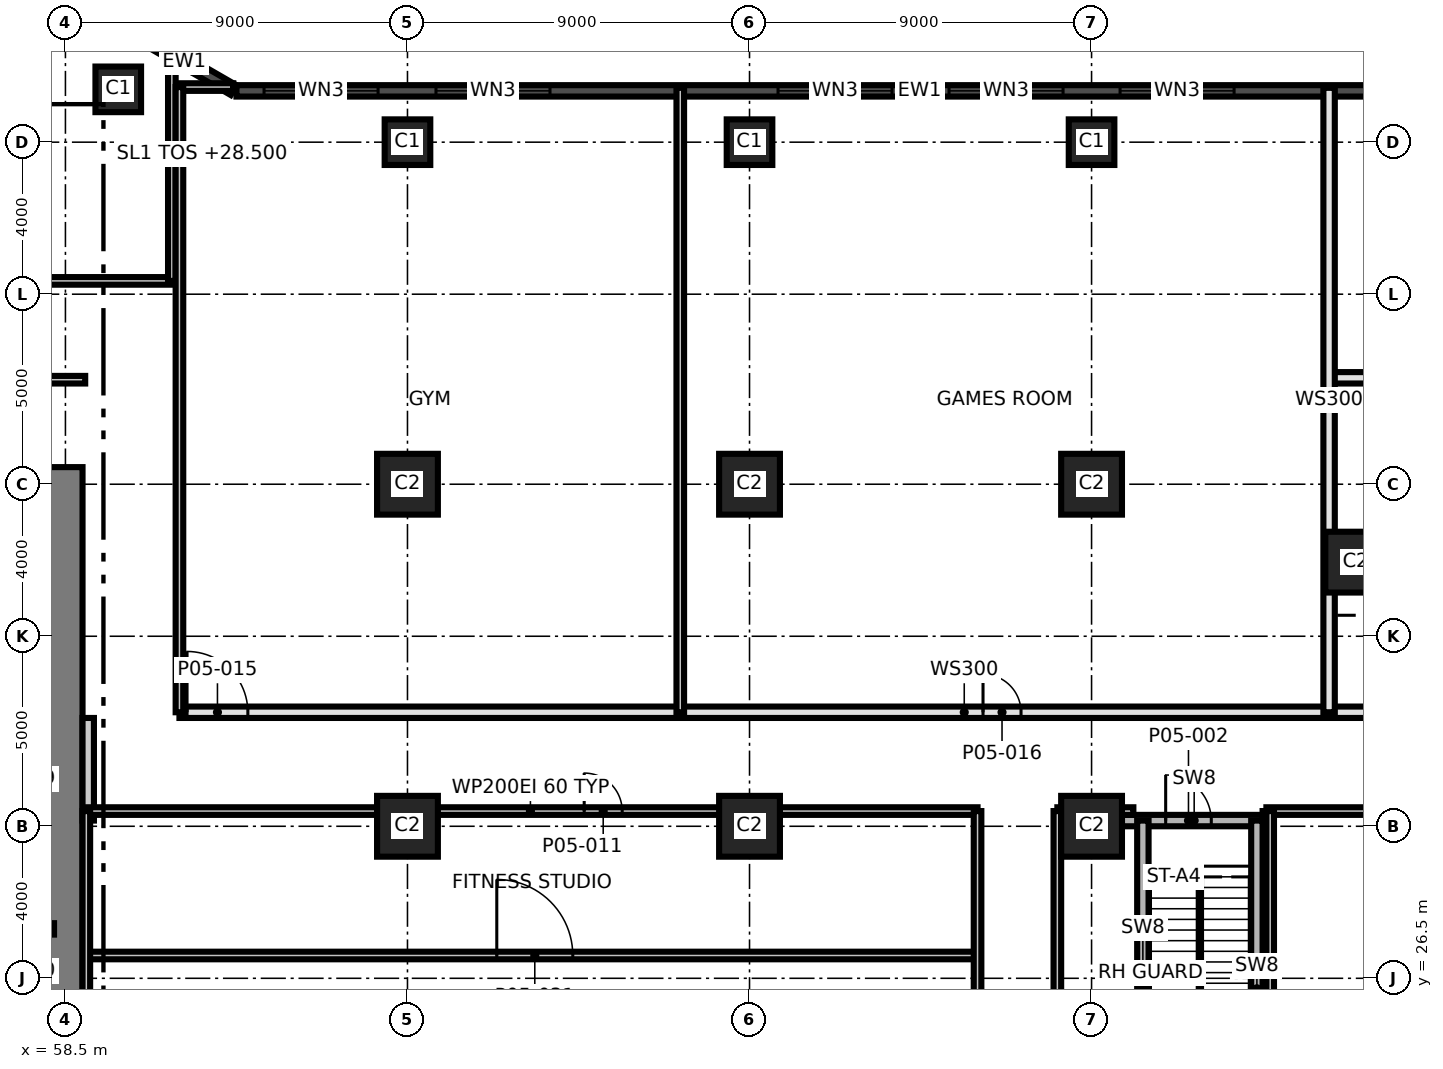
"""IFC4 building model, lengths in metres.
Left out: names, types, materials, properties, quantities, classifications, styles, units other than length and angle.
Written with IfcOpenShell. Run it as: python <this file> out.ifc"""

import sys

from ifc_helpers import new_model, si_unit, direction, frame, frame_2d, origin, origin_2d, place, context, subcontext, project, spatial, rectangle, extrude, element, fill, save


model = new_model("IFC4")
c1 = context("Model", 3, precision=1e-05, world=origin(), true_north=direction((0.0, 1.0)))
c2 = subcontext(c1, "Body", "Model", "MODEL_VIEW")
j1 = project(units=[si_unit("LENGTHUNIT", "METRE"), si_unit("PLANEANGLEUNIT", "RADIAN")], contexts=[c1])
p1 = place(None, origin())
s1 = spatial("IfcSite", under=j1, at=p1, CompositionType="ELEMENT")
p2 = place(p1, origin())
s2 = spatial("IfcBuilding", under=s1, at=p2, CompositionType="ELEMENT")
p3 = place(p2, frame((0.0, 0.0, 28.5)))
s3 = spatial("IfcBuildingStorey", under=s2, at=p3, CompositionType="ELEMENT", Elevation=28.5)
p4 = place(p3, frame((58.5, 21.05, 0.0), z_axis=(0.0, 0.0, 1.0), x_axis=(0.0, 1.0, 0.0)))
e1 = element("IfcWall", 1, at=p4, inside=s3, PredefinedType="SHEAR", context=c2, shape_type="SweptSolid", body=[
    extrude(rectangle(XDim=18.9, YDim=0.9, at=frame_2d((9.45, 0.0))), origin(), (0.0, 0.0, 1.0), 5.0),
])
for number, where, z_axis, x_axis in (
    (2, (67.5, 30.5, 0.0), (0.0, 0.0, 1.0), (1.0, 0.0, 0.0)),
    (3, (76.5, 30.5, 0.0), (0.0, 0.0, 1.0), (1.0, 0.0, 0.0)),
    (4, (85.5, 30.5, 0.0), (0.0, 0.0, 1.0), (1.0, 0.0, 0.0)),
    (5, (67.5, 39.5, 0.0), (0.0, 0.0, 1.0), (1.0, 0.0, 0.0)),
    (6, (76.5, 39.5, 0.0), (0.0, 0.0, 1.0), (1.0, 0.0, 0.0)),
    (7, (85.5, 39.5, 0.0), (0.0, 0.0, 1.0), (1.0, 0.0, 0.0)),
):
    element("IfcColumn", number, at=place(p3, frame(where, z_axis=z_axis, x_axis=x_axis)), inside=s3, PredefinedType="COLUMN", context=c2, shape_type="SweptSolid", body=[
        extrude(rectangle(XDim=1.6, YDim=1.6, at=origin_2d()), origin(), (0.0, 0.0, 1.0), 5.0),
    ])
for number, where, z_axis, x_axis in (
    (8, (67.5, 48.5, 0.0), (0.0, 0.0, 1.0), (1.0, 0.0, 0.0)),
    (9, (76.5, 48.5, 0.0), (0.0, 0.0, 1.0), (1.0, 0.0, 0.0)),
    (10, (85.5, 48.5, 0.0), (0.0, 0.0, 1.0), (1.0, 0.0, 0.0)),
    (11, (59.89, 49.89, 0.0), (0.0, 0.0, 1.0), (1.0, 0.0, 0.0)),
):
    element("IfcColumn", number, at=place(p3, frame(where, z_axis=z_axis, x_axis=x_axis)), inside=s3, PredefinedType="COLUMN", context=c2, shape_type="SweptSolid", body=[
        extrude(rectangle(XDim=1.2, YDim=1.2, at=origin_2d()), origin(), (0.0, 0.0, 1.0), 5.0),
    ])
p5 = place(p3, frame((92.45, 37.45, 0.0), z_axis=(0.0, 0.0, 1.0), x_axis=(1.0, 0.0, 0.0)))
e12 = element("IfcColumn", 12, at=p5, inside=s3, PredefinedType="COLUMN", context=c2, shape_type="SweptSolid", body=[
    extrude(rectangle(XDim=1.6, YDim=1.6, at=origin_2d()), origin(), (0.0, 0.0, 1.0), 5.0),
])
p6 = place(p3, frame((98.952, 49.85, 0.0), z_axis=(0.0, 0.0, 1.0), x_axis=(-1.0, 0.0, 0.0)))
e13 = element("IfcWall", 13, at=p6, inside=s3, PredefinedType="SOLIDWALL", context=c2, shape_type="SweptSolid", body=[
    extrude(rectangle(XDim=35.952, YDim=0.3, at=frame_2d((17.976, 0.0))), origin(), (0.0, 0.0, 1.0), 4.7),
])
p7 = place(p6, frame((9.702, 0.0, 0.9)))
e14 = element("IfcOpeningElement", 14, at=p7, cuts=e13, PredefinedType="OPENING", context=c2, shape_type="SweptSolid", body=[
    extrude(rectangle(XDim=3.0, YDim=2.4, at=frame_2d((1.5, 1.2))), frame((0.0, 0.16, 0.0), z_axis=(0.0, -1.0, 0.0), x_axis=(1.0, 0.0, 0.0)), (0.0, 0.0, 1.0), 0.32),
])
p8 = place(p6, frame((14.202, 0.0, 0.9)))
e15 = element("IfcOpeningElement", 15, at=p8, cuts=e13, PredefinedType="OPENING", context=c2, shape_type="SweptSolid", body=[
    extrude(rectangle(XDim=3.0, YDim=2.4, at=frame_2d((1.5, 1.2))), frame((0.0, 0.16, 0.0), z_axis=(0.0, -1.0, 0.0), x_axis=(1.0, 0.0, 0.0)), (0.0, 0.0, 1.0), 0.32),
])
p9 = place(p6, frame((18.702, 0.0, 0.9)))
e16 = element("IfcOpeningElement", 16, at=p9, cuts=e13, PredefinedType="OPENING", context=c2, shape_type="SweptSolid", body=[
    extrude(rectangle(XDim=3.0, YDim=2.4, at=frame_2d((1.5, 1.2))), frame((0.0, 0.16, 0.0), z_axis=(0.0, -1.0, 0.0), x_axis=(1.0, 0.0, 0.0)), (0.0, 0.0, 1.0), 0.32),
])
p10 = place(p6, frame((27.702, 0.0, 0.9)))
e17 = element("IfcOpeningElement", 17, at=p10, cuts=e13, PredefinedType="OPENING", context=c2, shape_type="SweptSolid", body=[
    extrude(rectangle(XDim=3.0, YDim=2.4, at=frame_2d((1.5, 1.2))), frame((0.0, 0.16, 0.0), z_axis=(0.0, -1.0, 0.0), x_axis=(1.0, 0.0, 0.0)), (0.0, 0.0, 1.0), 0.32),
])
p11 = place(p6, frame((32.226, 0.0, 0.9)))
e18 = element("IfcOpeningElement", 18, at=p11, cuts=e13, PredefinedType="OPENING", context=c2, shape_type="SweptSolid", body=[
    extrude(rectangle(XDim=3.0, YDim=2.4, at=frame_2d((1.5, 1.2))), frame((0.0, 0.16, 0.0), z_axis=(0.0, -1.0, 0.0), x_axis=(1.0, 0.0, 0.0)), (0.0, 0.0, 1.0), 0.32),
])
p12 = place(p3, frame((62.925, 49.87, 0.0), z_axis=(0.0, 0.0, 1.0), x_axis=(-0.866031096941, 0.499990139034, 0.0)))
e19 = element("IfcWall", 19, at=p12, inside=s3, PredefinedType="SOLIDWALL", context=c2, shape_type="SweptSolid", body=[
    extrude(rectangle(XDim=3.0, YDim=0.3, at=frame_2d((1.5, 0.0))), origin(), (0.0, 0.0, 1.0), 4.7),
])
p13 = place(p3, frame((55.8, 27.8, 0.0), z_axis=(0.0, 0.0, 1.0), x_axis=(1.0, 0.0, 0.0)))
e20 = element("IfcWall", 20, at=p13, inside=s3, PredefinedType="PARTITIONING", context=c2, shape_type="SweptSolid", body=[
    extrude(rectangle(XDim=2.4, YDim=0.3, at=frame_2d((1.2, 0.0))), origin(), (0.0, 0.0, 1.0), 4.7),
])
p14 = place(p13, frame((0.75, 0.0, 0.0)))
e21 = element("IfcOpeningElement", 21, at=p14, cuts=e20, PredefinedType="OPENING", context=c2, shape_type="SweptSolid", body=[
    extrude(rectangle(XDim=0.9, YDim=2.1, at=frame_2d((0.45, 1.05))), frame((0.0, 0.16, 0.0), z_axis=(0.0, -1.0, 0.0), x_axis=(1.0, 0.0, 0.0)), (0.0, 0.0, 1.0), 0.32),
])
p15 = place(p3, frame((59.1, 30.65, 0.0), z_axis=(0.0, 0.0, 1.0), x_axis=(0.0, 1.0, 0.0)))
e22 = element("IfcWall", 22, at=p15, inside=s3, PredefinedType="PARTITIONING", context=c2, shape_type="SweptSolid", body=[
    extrude(rectangle(XDim=2.7, YDim=0.3, at=frame_2d((1.35, 0.0))), origin(), (0.0, 0.0, 1.0), 4.7),
])
p16 = place(p3, frame((59.05, 27.1, 0.0), z_axis=(0.0, 0.0, 1.0), x_axis=(1.0, 0.0, 0.0)))
e23 = element("IfcWall", 23, at=p16, inside=s3, PredefinedType="PARTITIONING", context=c2, shape_type="SweptSolid", body=[
    extrude(rectangle(XDim=23.45, YDim=0.2, at=frame_2d((11.725, 0.0))), origin(), (0.0, 0.0, 1.0), 4.7),
])
p17 = place(p16, frame((10.8, 0.0, 0.0)))
e24 = element("IfcOpeningElement", 24, at=p17, cuts=e23, PredefinedType="OPENING", context=c2, shape_type="SweptSolid", body=[
    extrude(rectangle(XDim=2.0, YDim=2.1, at=frame_2d((1.0, 1.05))), frame((0.0, 0.11, 0.0), z_axis=(0.0, -1.0, 0.0), x_axis=(1.0, 0.0, 0.0)), (0.0, 0.0, 1.0), 0.22),
])
p18 = place(p3, frame((86.3, 30.65, 0.0), z_axis=(0.0, 0.0, 1.0), x_axis=(1.0, 0.0, 0.0)))
e25 = element("IfcWall", 25, at=p18, inside=s3, PredefinedType="SHEAR", context=c2, shape_type="SweptSolid", body=[
    extrude(rectangle(XDim=3.8, YDim=0.3, at=frame_2d((1.9, 0.0))), origin(), (0.0, 0.0, 1.0), 4.7),
])
p19 = place(p18, frame((1.15, 0.0, 0.0)))
e26 = element("IfcOpeningElement", 26, at=p19, cuts=e25, PredefinedType="OPENING", context=c2, shape_type="SweptSolid", body=[
    extrude(rectangle(XDim=1.2, YDim=2.1, at=frame_2d((0.6, 1.05))), frame((0.0, 0.16, 0.0), z_axis=(0.0, -1.0, 0.0), x_axis=(1.0, 0.0, 0.0)), (0.0, 0.0, 1.0), 0.32),
])
p20 = place(p3, frame((58.97, 30.9, 0.0), z_axis=(0.0, 0.0, 1.0), x_axis=(1.0, 0.0, 0.0)))
e27 = element("IfcWall", 27, at=p20, inside=s3, PredefinedType="PARTITIONING", context=c2, shape_type="SweptSolid", body=[
    extrude(rectangle(XDim=23.53, YDim=0.2, at=frame_2d((11.765, 0.0))), origin(), (0.0, 0.0, 1.0), 4.7),
])
p21 = place(p20, frame((13.18, 0.0, 0.0)))
e28 = element("IfcOpeningElement", 28, at=p21, cuts=e27, PredefinedType="OPENING", context=c2, shape_type="SweptSolid", body=[
    extrude(rectangle(XDim=1.0, YDim=2.1, at=frame_2d((0.5, 1.05))), frame((0.0, 0.11, 0.0), z_axis=(0.0, -1.0, 0.0), x_axis=(1.0, 0.0, 0.0)), (0.0, 0.0, 1.0), 0.22),
])
p22 = place(p3, frame((84.6, 30.9, 0.0), z_axis=(0.0, 0.0, 1.0), x_axis=(1.0, 0.0, 0.0)))
e29 = element("IfcWall", 29, at=p22, inside=s3, PredefinedType="PARTITIONING", context=c2, shape_type="SweptSolid", body=[
    extrude(rectangle(XDim=2.0, YDim=0.2, at=frame_2d((1.0, 0.0))), origin(), (0.0, 0.0, 1.0), 4.7),
])
p23 = place(p3, frame((90.1, 30.9, 0.0), z_axis=(0.0, 0.0, 1.0), x_axis=(1.0, 0.0, 0.0)))
e30 = element("IfcWall", 30, at=p23, inside=s3, PredefinedType="PARTITIONING", context=c2, shape_type="SweptSolid", body=[
    extrude(rectangle(XDim=14.83, YDim=0.2, at=frame_2d((7.415, 0.0))), origin(), (0.0, 0.0, 1.0), 2.7),
])
p24 = place(p23, frame((5.4, 0.0, 0.0)))
e31 = element("IfcOpeningElement", 31, at=p24, cuts=e30, PredefinedType="OPENING", context=c2, shape_type="SweptSolid", body=[
    extrude(rectangle(XDim=1.0, YDim=2.1, at=frame_2d((0.5, 1.05))), frame((0.0, 0.11, 0.0), z_axis=(0.0, -1.0, 0.0), x_axis=(1.0, 0.0, 0.0)), (0.0, 0.0, 1.0), 0.22),
])
p25 = place(p23, frame((10.742, 0.0, 0.0)))
e32 = element("IfcOpeningElement", 32, at=p25, cuts=e30, PredefinedType="OPENING", context=c2, shape_type="SweptSolid", body=[
    extrude(rectangle(XDim=1.0, YDim=2.1, at=frame_2d((0.5, 1.05))), frame((0.0, 0.11, 0.0), z_axis=(0.0, -1.0, 0.0), x_axis=(1.0, 0.0, 0.0)), (0.0, 0.0, 1.0), 0.22),
])
p26 = place(p3, frame((61.5, 33.5, 0.0), z_axis=(0.0, 0.0, 1.0), x_axis=(1.0, 0.0, 0.0)))
e33 = element("IfcWall", 33, at=p26, inside=s3, PredefinedType="SOLIDWALL", context=c2, shape_type="SweptSolid", body=[
    extrude(rectangle(XDim=41.3, YDim=0.3, at=frame_2d((20.65, 0.0))), origin(), (0.0, 0.0, 1.0), 4.7),
])
p27 = place(p26, frame((31.95, 0.0, 0.0)))
e34 = element("IfcOpeningElement", 34, at=p27, cuts=e33, PredefinedType="OPENING", context=c2, shape_type="SweptSolid", body=[
    extrude(rectangle(XDim=1.8, YDim=2.1, at=frame_2d((0.9, 1.05))), frame((0.0, 0.16, 0.0), z_axis=(0.0, -1.0, 0.0), x_axis=(1.0, 0.0, 0.0)), (0.0, 0.0, 1.0), 0.32),
])
p28 = place(p26, frame((0.2, 0.0, 0.0)))
e35 = element("IfcOpeningElement", 35, at=p28, cuts=e33, PredefinedType="OPENING", context=c2, shape_type="SweptSolid", body=[
    extrude(rectangle(XDim=1.6, YDim=2.1, at=frame_2d((0.8, 1.05))), frame((0.0, 0.16, 0.0), z_axis=(0.0, -1.0, 0.0), x_axis=(1.0, 0.0, 0.0)), (0.0, 0.0, 1.0), 0.32),
])
p29 = place(p26, frame((21.144, 0.0, 0.0)))
e36 = element("IfcOpeningElement", 36, at=p29, cuts=e33, PredefinedType="OPENING", context=c2, shape_type="SweptSolid", body=[
    extrude(rectangle(XDim=1.0, YDim=2.1, at=frame_2d((0.5, 1.05))), frame((0.0, 0.16, 0.0), z_axis=(0.0, -1.0, 0.0), x_axis=(1.0, 0.0, 0.0)), (0.0, 0.0, 1.0), 0.32),
])
p30 = place(p26, frame((37.853, 0.0, 0.0)))
e37 = element("IfcOpeningElement", 37, at=p30, cuts=e33, PredefinedType="OPENING", context=c2, shape_type="SweptSolid", body=[
    extrude(rectangle(XDim=1.0, YDim=2.1, at=frame_2d((0.5, 1.05))), frame((0.0, 0.16, 0.0), z_axis=(0.0, -1.0, 0.0), x_axis=(1.0, 0.0, 0.0)), (0.0, 0.0, 1.0), 0.32),
])
p31 = place(p3, frame((43.3, 42.25, 0.0), z_axis=(0.0, 0.0, 1.0), x_axis=(1.0, 0.0, 0.0)))
e38 = element("IfcWall", 38, at=p31, inside=s3, PredefinedType="PARTITIONING", context=c2, shape_type="SweptSolid", body=[
    extrude(rectangle(XDim=15.72, YDim=0.2, at=frame_2d((7.86, 0.0))), origin(), (0.0, 0.0, 1.0), 4.7),
])
p32 = place(p31, frame((5.2, 0.0, 0.0)))
e39 = element("IfcOpeningElement", 39, at=p32, cuts=e38, PredefinedType="OPENING", context=c2, shape_type="SweptSolid", body=[
    extrude(rectangle(XDim=1.0, YDim=2.1, at=frame_2d((0.5, 1.05))), frame((0.0, 0.11, 0.0), z_axis=(0.0, -1.0, 0.0), x_axis=(1.0, 0.0, 0.0)), (0.0, 0.0, 1.0), 0.22),
])
p33 = place(p3, frame((91.75, 42.3, 0.0), z_axis=(0.0, 0.0, 1.0), x_axis=(1.0, 0.0, 0.0)))
e40 = element("IfcWall", 40, at=p33, inside=s3, PredefinedType="SOLIDWALL", context=c2, shape_type="SweptSolid", body=[
    extrude(rectangle(XDim=5.2, YDim=0.3, at=frame_2d((2.6, 0.0))), origin(), (0.0, 0.0, 1.0), 4.7),
])
p34 = place(p3, frame((43.3, 44.85, 0.0), z_axis=(0.0, 0.0, 1.0), x_axis=(1.0, 0.0, 0.0)))
e41 = element("IfcWall", 41, at=p34, inside=s3, PredefinedType="PARTITIONING", context=c2, shape_type="SweptSolid", body=[
    extrude(rectangle(XDim=18.2, YDim=0.2, at=frame_2d((9.1, 0.0))), origin(), (0.0, 0.0, 1.0), 4.7),
])
p35 = place(p34, frame((3.377, 0.0, 0.0)))
e42 = element("IfcOpeningElement", 42, at=p35, cuts=e41, PredefinedType="OPENING", context=c2, shape_type="SweptSolid", body=[
    extrude(rectangle(XDim=2.2, YDim=2.4, at=frame_2d((1.1, 1.2))), frame((0.0, 0.11, 0.0), z_axis=(0.0, -1.0, 0.0), x_axis=(1.0, 0.0, 0.0)), (0.0, 0.0, 1.0), 0.22),
])
p36 = place(p3, frame((61.5, 49.95, 0.0), z_axis=(0.0, 0.0, 1.0), x_axis=(1.0, 0.0, 0.0)))
e43 = element("IfcWall", 43, at=p36, inside=s3, PredefinedType="PARTITIONING", context=c2, shape_type="SweptSolid", body=[
    extrude(rectangle(XDim=1.416, YDim=0.2, at=frame_2d((0.708, 0.0))), origin(), (0.0, 0.0, 1.0), 4.7),
])
p37 = place(p3, frame((59.05, 11.07, 0.0), z_axis=(0.0, 0.0, 1.0), x_axis=(0.0, 1.0, 0.0)))
e44 = element("IfcWall", 44, at=p37, inside=s3, PredefinedType="PARTITIONING", context=c2, shape_type="SweptSolid", body=[
    extrude(rectangle(XDim=19.83, YDim=0.2, at=frame_2d((9.915, 0.0))), origin(), (0.0, 0.0, 1.0), 4.7),
])
p38 = place(p3, frame((61.3, 44.85, 0.0), z_axis=(0.0, 0.0, 1.0), x_axis=(0.0, 1.0, 0.0)))
e45 = element("IfcWall", 45, at=p38, inside=s3, PredefinedType="PARTITIONING", context=c2, shape_type="SweptSolid", body=[
    extrude(rectangle(XDim=5.742, YDim=0.2, at=frame_2d((2.871, 0.0))), origin(), (0.0, 0.0, 1.0), 4.7),
])
p39 = place(p3, frame((61.5, 33.5, 0.0), z_axis=(0.0, 0.0, 1.0), x_axis=(0.0, 1.0, 0.0)))
e46 = element("IfcWall", 46, at=p39, inside=s3, PredefinedType="PARTITIONING", context=c2, shape_type="SweptSolid", body=[
    extrude(rectangle(XDim=16.45, YDim=0.2, at=frame_2d((8.225, 0.0))), origin(), (0.0, 0.0, 1.0), 4.7),
])
p40 = place(p3, frame((74.678, 33.5, 0.0), z_axis=(0.0, 0.0, 1.0), x_axis=(0.0, 1.0, 0.0)))
e47 = element("IfcWall", 47, at=p40, inside=s3, PredefinedType="PARTITIONING", context=c2, shape_type="SweptSolid", body=[
    extrude(rectangle(XDim=16.43, YDim=0.2, at=frame_2d((8.215, 0.0))), origin(), (0.0, 0.0, 1.0), 4.7),
])
p41 = place(p3, frame((82.5, 11.07, 0.0), z_axis=(0.0, 0.0, 1.0), x_axis=(0.0, 1.0, 0.0)))
e48 = element("IfcWall", 48, at=p41, inside=s3, PredefinedType="PARTITIONING", context=c2, shape_type="SweptSolid", body=[
    extrude(rectangle(XDim=19.83, YDim=0.2, at=frame_2d((9.915, 0.0))), origin(), (0.0, 0.0, 1.0), 4.7),
])
p42 = place(p41, frame((10.28, 0.0, 0.0)))
e49 = element("IfcOpeningElement", 49, at=p42, cuts=e48, PredefinedType="OPENING", context=c2, shape_type="SweptSolid", body=[
    extrude(rectangle(XDim=1.6, YDim=2.1, at=frame_2d((0.8, 1.05))), frame((0.0, 0.11, 0.0), z_axis=(0.0, -1.0, 0.0), x_axis=(1.0, 0.0, 0.0)), (0.0, 0.0, 1.0), 0.22),
])
p43 = place(p3, frame((84.6, 17.4, 0.0), z_axis=(0.0, 0.0, 1.0), x_axis=(0.0, 1.0, 0.0)))
e50 = element("IfcWall", 50, at=p43, inside=s3, PredefinedType="PARTITIONING", context=c2, shape_type="SweptSolid", body=[
    extrude(rectangle(XDim=13.5, YDim=0.2, at=frame_2d((6.75, 0.0))), origin(), (0.0, 0.0, 1.0), 4.7),
])
for number, where, z_axis, x_axis in (
    (51, (86.85, 21.8, 0.0), (0.0, 0.0, 1.0), (0.0, 1.0, 0.0)),
    (52, (89.85, 21.8, 0.0), (0.0, 0.0, 1.0), (0.0, 1.0, 0.0)),
):
    element("IfcWall", number, at=place(p3, frame(where, z_axis=z_axis, x_axis=x_axis)), inside=s3, PredefinedType="SHEAR", context=c2, shape_type="SweptSolid", body=[
        extrude(rectangle(XDim=8.85, YDim=0.3, at=frame_2d((4.425, 0.0))), origin(), (0.0, 0.0, 1.0), 4.7),
    ])
p44 = place(p3, frame((90.1, 30.65, 0.0), z_axis=(0.0, 0.0, 1.0), x_axis=(0.0, 1.0, 0.0)))
e53 = element("IfcWall", 53, at=p44, inside=s3, PredefinedType="PARTITIONING", context=c2, shape_type="SweptSolid", body=[
    extrude(rectangle(XDim=0.25, YDim=0.2, at=frame_2d((0.125, 0.0))), origin(), (0.0, 0.0, 1.0), 4.7),
])
p45 = place(p3, frame((90.2, 11.07, 0.0), z_axis=(0.0, 0.0, 1.0), x_axis=(0.0, 1.0, 0.0)))
e54 = element("IfcWall", 54, at=p45, inside=s3, PredefinedType="PARTITIONING", context=c2, shape_type="SweptSolid", body=[
    extrude(rectangle(XDim=19.83, YDim=0.2, at=frame_2d((9.915, 0.0))), origin(), (0.0, 0.0, 1.0), 4.7),
])
p46 = place(p3, frame((91.75, 33.5, 0.0), z_axis=(0.0, 0.0, 1.0), x_axis=(0.0, 1.0, 0.0)))
e55 = element("IfcWall", 55, at=p46, inside=s3, PredefinedType="SOLIDWALL", context=c2, shape_type="SweptSolid", body=[
    extrude(rectangle(XDim=16.43, YDim=0.3, at=frame_2d((8.215, 0.0))), origin(), (0.0, 0.0, 1.0), 4.7),
])
p47 = place(p7, origin())
e56 = element("IfcWindow", 56, at=p47, inside=s3, PartitioningType="SINGLE_PANEL", PredefinedType="WINDOW", context=c2, shape_type="SweptSolid", body=[
    extrude(rectangle(XDim=3.0, YDim=2.4, at=frame_2d((1.5, 1.2))), frame((0.0, 0.03, 0.0), z_axis=(0.0, -1.0, 0.0), x_axis=(1.0, 0.0, 0.0)), (0.0, 0.0, 1.0), 0.06),
])
fill(e14, e56)
p48 = place(p8, origin())
e57 = element("IfcWindow", 57, at=p48, inside=s3, PartitioningType="SINGLE_PANEL", PredefinedType="WINDOW", context=c2, shape_type="SweptSolid", body=[
    extrude(rectangle(XDim=3.0, YDim=2.4, at=frame_2d((1.5, 1.2))), frame((0.0, 0.03, 0.0), z_axis=(0.0, -1.0, 0.0), x_axis=(1.0, 0.0, 0.0)), (0.0, 0.0, 1.0), 0.06),
])
fill(e15, e57)
p49 = place(p9, origin())
e58 = element("IfcWindow", 58, at=p49, inside=s3, PartitioningType="SINGLE_PANEL", PredefinedType="WINDOW", context=c2, shape_type="SweptSolid", body=[
    extrude(rectangle(XDim=3.0, YDim=2.4, at=frame_2d((1.5, 1.2))), frame((0.0, 0.03, 0.0), z_axis=(0.0, -1.0, 0.0), x_axis=(1.0, 0.0, 0.0)), (0.0, 0.0, 1.0), 0.06),
])
fill(e16, e58)
p50 = place(p10, origin())
e59 = element("IfcWindow", 59, at=p50, inside=s3, PartitioningType="SINGLE_PANEL", PredefinedType="WINDOW", context=c2, shape_type="SweptSolid", body=[
    extrude(rectangle(XDim=3.0, YDim=2.4, at=frame_2d((1.5, 1.2))), frame((0.0, 0.03, 0.0), z_axis=(0.0, -1.0, 0.0), x_axis=(1.0, 0.0, 0.0)), (0.0, 0.0, 1.0), 0.06),
])
fill(e17, e59)
p51 = place(p11, origin())
e60 = element("IfcWindow", 60, at=p51, inside=s3, PartitioningType="SINGLE_PANEL", PredefinedType="WINDOW", context=c2, shape_type="SweptSolid", body=[
    extrude(rectangle(XDim=3.0, YDim=2.4, at=frame_2d((1.5, 1.2))), frame((0.0, 0.03, 0.0), z_axis=(0.0, -1.0, 0.0), x_axis=(1.0, 0.0, 0.0)), (0.0, 0.0, 1.0), 0.06),
])
fill(e18, e60)
p52 = place(p19, origin())
e61 = element("IfcDoor", 61, at=p52, inside=s3, OperationType="SINGLE_SWING_RIGHT", PredefinedType="DOOR", context=c2, shape_type="SweptSolid", body=[
    extrude(rectangle(XDim=1.2, YDim=2.1, at=frame_2d((0.6, 1.05))), frame((0.0, 0.025, 0.0), z_axis=(0.0, -1.0, 0.0), x_axis=(1.0, 0.0, 0.0)), (0.0, 0.0, 1.0), 0.05),
])
fill(e26, e61)
p53 = place(p21, origin())
e62 = element("IfcDoor", 62, at=p53, inside=s3, OperationType="SINGLE_SWING_LEFT", PredefinedType="DOOR", context=c2, shape_type="SweptSolid", body=[
    extrude(rectangle(XDim=1.0, YDim=2.1, at=frame_2d((0.5, 1.05))), frame((0.0, 0.025, 0.0), z_axis=(0.0, -1.0, 0.0), x_axis=(1.0, 0.0, 0.0)), (0.0, 0.0, 1.0), 0.05),
])
fill(e28, e62)
p54 = place(p28, origin())
e63 = element("IfcDoor", 63, at=p54, inside=s3, OperationType="SINGLE_SWING_LEFT", PredefinedType="DOOR", context=c2, shape_type="SweptSolid", body=[
    extrude(rectangle(XDim=1.6, YDim=2.1, at=frame_2d((0.8, 1.05))), frame((0.0, 0.025, 0.0), z_axis=(0.0, -1.0, 0.0), x_axis=(1.0, 0.0, 0.0)), (0.0, 0.0, 1.0), 0.05),
])
fill(e35, e63)
p55 = place(p29, origin())
e64 = element("IfcDoor", 64, at=p55, inside=s3, OperationType="SINGLE_SWING_RIGHT", PredefinedType="DOOR", context=c2, shape_type="SweptSolid", body=[
    extrude(rectangle(XDim=1.0, YDim=2.1, at=frame_2d((0.5, 1.05))), frame((0.0, 0.025, 0.0), z_axis=(0.0, -1.0, 0.0), x_axis=(1.0, 0.0, 0.0)), (0.0, 0.0, 1.0), 0.05),
])
fill(e36, e64)
p56 = place(p17, origin())
e65 = element("IfcDoor", 65, at=p56, inside=s3, OperationType="SINGLE_SWING_LEFT", PredefinedType="DOOR", context=c2, shape_type="SweptSolid", body=[
    extrude(rectangle(XDim=2.0, YDim=2.1, at=frame_2d((1.0, 1.05))), frame((0.0, 0.025, 0.0), z_axis=(0.0, -1.0, 0.0), x_axis=(1.0, 0.0, 0.0)), (0.0, 0.0, 1.0), 0.05),
])
fill(e24, e65)
save(model, sys.argv[1])
